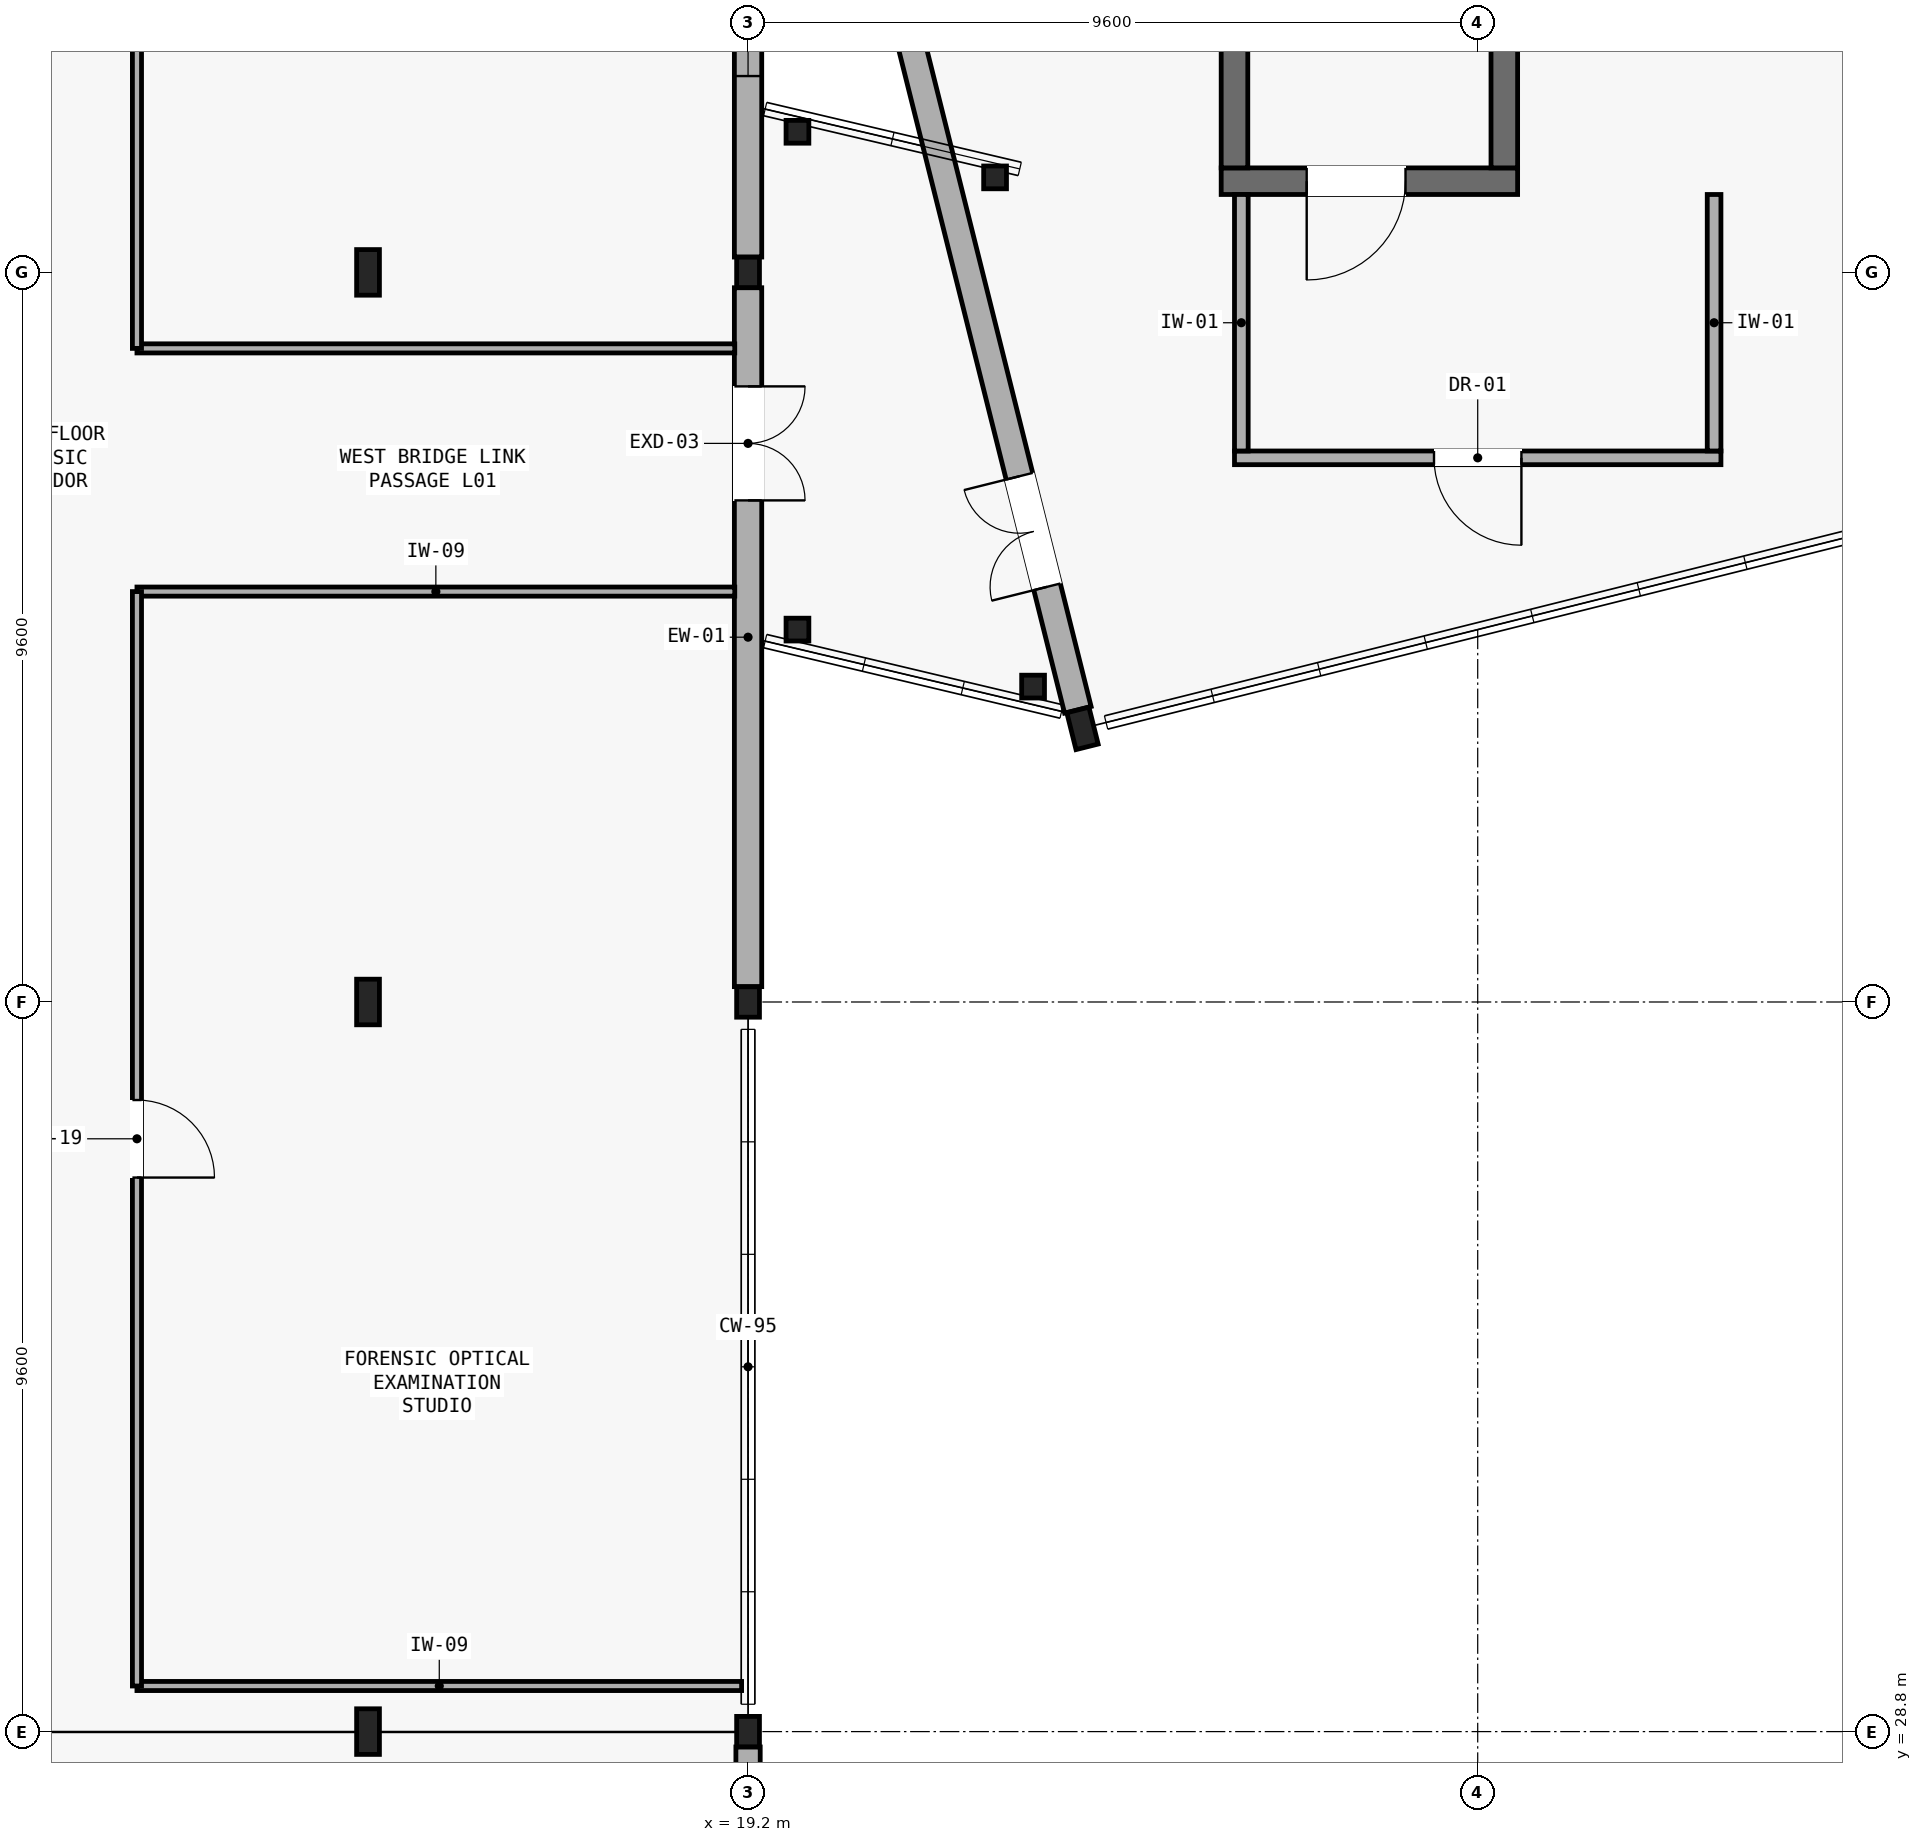
"""IFC4 building model, lengths in metres.
Left out: names, types, materials, properties, quantities, classifications, styles, units other than length and angle.
Written with IfcOpenShell. Run it as: python <this file> out.ifc"""

import sys

from ifc_helpers import new_model, si_unit, direction, frame, frame_2d, origin, origin_2d, place, context, subcontext, project, spatial, rectangle, i_section, extrude, element, fill, save


model = new_model("IFC4")
c1 = context("Model", 3, precision=1e-05, world=origin(), true_north=direction((0.0, 1.0)))
c2 = subcontext(c1, "Body", "Model", "MODEL_VIEW")
j1 = project(units=[si_unit("LENGTHUNIT", "METRE"), si_unit("PLANEANGLEUNIT", "RADIAN")], contexts=[c1])
p1 = place(None, origin())
s1 = spatial("IfcSite", under=j1, at=p1, CompositionType="ELEMENT")
p2 = place(p1, origin())
s2 = spatial("IfcBuilding", under=s1, at=p2, CompositionType="ELEMENT")
p3 = place(p2, frame((0.0, 0.0, 5.25)))
s3 = spatial("IfcBuildingStorey", under=s2, at=p3, CompositionType="ELEMENT", Elevation=5.25)
for number, where, z_axis, x_axis in (
    (1, (19.85, 49.85, 0.0), (0.0, 0.0, 1.0), (1.0, 0.0, 0.0)),
    (2, (19.85, 43.3, 0.0), (0.0, 0.0, 1.0), (1.0, 0.0, 0.0)),
    (3, (22.45, 49.25, 0.0), (0.0, 0.0, 1.0), (1.0, 0.0, 0.0)),
    (4, (22.95, 42.55, 0.0), (0.0, 0.0, 1.0), (1.0, 0.0, 0.0)),
):
    element("IfcColumn", number, at=place(p3, frame(where, z_axis=z_axis, x_axis=x_axis)), inside=s3, PredefinedType="COLUMN", context=c2, shape_type="SweptSolid", body=[
        extrude(i_section(OverallWidth=0.3, OverallDepth=0.3, WebThickness=0.011, FlangeThickness=0.019, FilletRadius=0.027, at=origin_2d()), origin(), (0.0, 0.0, 1.0), 4.2),
    ])
p4 = place(p3, frame((19.2, 28.8, 0.0), z_axis=(0.0, 0.0, 1.0), x_axis=(1.0, 0.0, 0.0)))
e5 = element("IfcColumn", 5, at=p4, inside=s3, PredefinedType="COLUMN", context=c2, shape_type="SweptSolid", body=[
    extrude(i_section(OverallWidth=0.3, OverallDepth=0.4, WebThickness=0.013, FlangeThickness=0.024, FilletRadius=0.027, at=origin_2d()), origin(), (0.0, 0.0, 1.0), 4.2),
])
p5 = place(p3, frame((14.2, 28.8, 0.0), z_axis=(0.0, 0.0, 1.0), x_axis=(1.0, 0.0, 0.0)))
e6 = element("IfcColumn", 6, at=p5, inside=s3, PredefinedType="COLUMN", context=c2, shape_type="SweptSolid", body=[
    extrude(i_section(OverallWidth=0.3, OverallDepth=0.6, WebThickness=0.015, FlangeThickness=0.03, FilletRadius=0.027, at=origin_2d()), origin(), (0.0, 0.0, 1.0), 4.2),
])
p6 = place(p3, frame((19.2, 38.4, 0.0), z_axis=(0.0, 0.0, 1.0), x_axis=(1.0, 0.0, 0.0)))
e7 = element("IfcColumn", 7, at=p6, inside=s3, PredefinedType="COLUMN", context=c2, shape_type="SweptSolid", body=[
    extrude(i_section(OverallWidth=0.3, OverallDepth=0.4, WebThickness=0.013, FlangeThickness=0.024, FilletRadius=0.027, at=origin_2d()), origin(), (0.0, 0.0, 1.0), 4.2),
])
p7 = place(p3, frame((14.2, 38.4, 0.0), z_axis=(0.0, 0.0, 1.0), x_axis=(1.0, 0.0, 0.0)))
e8 = element("IfcColumn", 8, at=p7, inside=s3, PredefinedType="COLUMN", context=c2, shape_type="SweptSolid", body=[
    extrude(i_section(OverallWidth=0.3, OverallDepth=0.6, WebThickness=0.015, FlangeThickness=0.03, FilletRadius=0.027, at=origin_2d()), origin(), (0.0, 0.0, 1.0), 4.2),
])
p8 = place(p3, frame((19.2, 48.0, 0.0), z_axis=(0.0, 0.0, 1.0), x_axis=(1.0, 0.0, 0.0)))
e9 = element("IfcColumn", 9, at=p8, inside=s3, PredefinedType="COLUMN", context=c2, shape_type="SweptSolid", body=[
    extrude(i_section(OverallWidth=0.3, OverallDepth=0.4, WebThickness=0.013, FlangeThickness=0.024, FilletRadius=0.027, at=origin_2d()), origin(), (0.0, 0.0, 1.0), 4.2),
])
p9 = place(p3, frame((14.2, 48.0, 0.0), z_axis=(0.0, 0.0, 1.0), x_axis=(1.0, 0.0, 0.0)))
e10 = element("IfcColumn", 10, at=p9, inside=s3, PredefinedType="COLUMN", context=c2, shape_type="SweptSolid", body=[
    extrude(i_section(OverallWidth=0.3, OverallDepth=0.6, WebThickness=0.015, FlangeThickness=0.03, FilletRadius=0.027, at=origin_2d()), origin(), (0.0, 0.0, 1.0), 4.2),
])
p10 = place(p3, frame((23.6, 42.0, 0.0), z_axis=(0.0, 0.0, 1.0), x_axis=(0.970142500145, 0.242535625038, 0.0)))
e11 = element("IfcColumn", 11, at=p10, inside=s3, PredefinedType="COLUMN", context=c2, shape_type="SweptSolid", body=[
    extrude(i_section(OverallWidth=0.3, OverallDepth=0.5, WebThickness=0.014, FlangeThickness=0.028, FilletRadius=0.027, at=origin_2d()), origin(), (0.0, 0.0, 1.0), 4.2),
])
p11 = place(p3, frame((19.2, 38.602, 0.0), z_axis=(0.0, 0.0, 1.0), x_axis=(0.0, 1.0, 0.0)))
e12 = element("IfcWall", 12, at=p11, inside=s3, PredefinedType="SOLIDWALL", context=c2, shape_type="SweptSolid", body=[
    extrude(rectangle(XDim=9.196, YDim=0.36, at=frame_2d((4.598, 0.0))), origin(), (0.0, 0.0, 1.0), 3.5),
])
p12 = place(p11, frame((6.398, 0.0, 0.0)))
e13 = element("IfcOpeningElement", 13, at=p12, cuts=e12, PredefinedType="OPENING", context=c2, shape_type="SweptSolid", body=[
    extrude(rectangle(XDim=1.5, YDim=2.2, at=frame_2d((0.75, 1.1))), frame((0.0, 0.19, 0.0), z_axis=(0.0, -1.0, 0.0), x_axis=(1.0, 0.0, 0.0)), (0.0, 0.0, 1.0), 0.38),
])
p13 = place(p3, frame((19.2, 48.202, 0.0), z_axis=(0.0, 0.0, 1.0), x_axis=(0.0, 1.0, 0.0)))
e14 = element("IfcWall", 14, at=p13, inside=s3, PredefinedType="SOLIDWALL", context=c2, shape_type="SweptSolid", body=[
    extrude(rectangle(XDim=9.196, YDim=0.36, at=frame_2d((4.598, 0.0))), origin(), (0.0, 0.0, 1.0), 3.5),
])
p14 = place(p13, frame((2.381, 0.0, 0.9)))
e15 = element("IfcOpeningElement", 15, at=p14, cuts=e14, PredefinedType="OPENING", context=c2, shape_type="SweptSolid", body=[
    extrude(rectangle(XDim=1.5, YDim=1.55, at=frame_2d((0.75, 0.775))), frame((0.0, 0.19, 0.0), z_axis=(0.0, -1.0, 0.0), x_axis=(1.0, 0.0, 0.0)), (0.0, 0.0, 1.0), 0.38),
])
p15 = place(p13, frame((5.315, 0.0, 0.9)))
e16 = element("IfcOpeningElement", 16, at=p15, cuts=e14, PredefinedType="OPENING", context=c2, shape_type="SweptSolid", body=[
    extrude(rectangle(XDim=1.5, YDim=1.55, at=frame_2d((0.75, 0.775))), frame((0.0, 0.19, 0.0), z_axis=(0.0, -1.0, 0.0), x_axis=(1.0, 0.0, 0.0)), (0.0, 0.0, 1.0), 0.38),
])
p16 = place(p3, frame((23.539, 42.244, 0.0), z_axis=(0.0, 0.0, 1.0), x_axis=(-0.242523223331, 0.970145600487, 0.0)))
e17 = element("IfcWall", 17, at=p16, inside=s3, PredefinedType="SOLIDWALL", context=c2, shape_type="SweptSolid", body=[
    extrude(rectangle(XDim=13.896, YDim=0.36, at=frame_2d((6.948, 0.0))), origin(), (0.0, 0.0, 1.0), 3.4),
])
p17 = place(p16, frame((1.668, 0.0, 0.0)))
e18 = element("IfcOpeningElement", 18, at=p17, cuts=e17, PredefinedType="OPENING", context=c2, shape_type="SweptSolid", body=[
    extrude(rectangle(XDim=1.5, YDim=2.2, at=frame_2d((0.75, 1.1))), frame((0.0, 0.19, 0.0), z_axis=(0.0, -1.0, 0.0), x_axis=(1.0, 0.0, 0.0)), (0.0, 0.0, 1.0), 0.38),
])
p18 = place(p3, frame((19.2, 27.372, 0.0), z_axis=(0.0, 0.0, 1.0), x_axis=(0.0, 1.0, 0.0)))
e19 = element("IfcWall", 19, at=p18, inside=s3, PredefinedType="SOLIDWALL", context=c2, shape_type="SweptSolid", body=[
    extrude(rectangle(XDim=1.226, YDim=0.32, at=frame_2d((0.613, 0.0))), origin(), (0.0, 0.0, 1.0), 3.9),
])
p19 = place(p3, frame((25.425, 49.2, 0.0), z_axis=(0.0, 0.0, 1.0), x_axis=(1.0, 0.0, 0.0)))
e20 = element("IfcWall", 20, at=p19, inside=s3, PredefinedType="SHEAR", context=c2, shape_type="SweptSolid", body=[
    extrude(rectangle(XDim=3.9, YDim=0.35, at=frame_2d((1.95, 0.0))), origin(), (0.0, 0.0, 1.0), 3.96),
])
p20 = place(p19, frame((1.125, 0.0, 0.0)))
e21 = element("IfcOpeningElement", 21, at=p20, cuts=e20, PredefinedType="OPENING", context=c2, shape_type="SweptSolid", body=[
    extrude(rectangle(XDim=1.3, YDim=2.15, at=frame_2d((0.65, 1.075))), frame((0.0, 0.185, 0.0), z_axis=(0.0, -1.0, 0.0), x_axis=(1.0, 0.0, 0.0)), (0.0, 0.0, 1.0), 0.37),
])
for number, where, z_axis, x_axis in (
    (22, (25.6, 49.375, 0.0), (0.0, 0.0, 1.0), (0.0, 1.0, 0.0)),
    (23, (29.15, 49.375, 0.0), (0.0, 0.0, 1.0), (0.0, 1.0, 0.0)),
):
    element("IfcWall", number, at=place(p3, frame(where, z_axis=z_axis, x_axis=x_axis)), inside=s3, PredefinedType="SHEAR", context=c2, shape_type="SweptSolid", body=[
        extrude(rectangle(XDim=7.6, YDim=0.35, at=frame_2d((3.8, 0.0))), origin(), (0.0, 0.0, 1.0), 3.96),
    ])
p21 = place(p3, frame((25.6, 45.56, 0.0), z_axis=(0.0, 0.0, 1.0), x_axis=(1.0, 0.0, 0.0)))
e24 = element("IfcWall", 24, at=p21, inside=s3, PredefinedType="PARTITIONING", context=c2, shape_type="SweptSolid", body=[
    extrude(rectangle(XDim=6.4, YDim=0.18, at=frame_2d((3.2, 0.0))), origin(), (0.0, 0.0, 1.0), 3.58),
])
p22 = place(p21, frame((2.625, 0.0, 0.0)))
e25 = element("IfcOpeningElement", 25, at=p22, cuts=e24, PredefinedType="OPENING", context=c2, shape_type="SweptSolid", body=[
    extrude(rectangle(XDim=1.15, YDim=2.15, at=frame_2d((0.575, 1.075))), frame((0.0, 0.1, 0.0), z_axis=(0.0, -1.0, 0.0), x_axis=(1.0, 0.0, 0.0)), (0.0, 0.0, 1.0), 0.2),
])
for number, where, z_axis, x_axis in (
    (26, (25.69, 45.65, 0.0), (0.0, 0.0, 1.0), (0.0, 1.0, 0.0)),
    (27, (31.91, 45.65, 0.0), (0.0, 0.0, 1.0), (0.0, 1.0, 0.0)),
):
    element("IfcWall", number, at=place(p3, frame(where, z_axis=z_axis, x_axis=x_axis)), inside=s3, PredefinedType="PARTITIONING", context=c2, shape_type="SweptSolid", body=[
        extrude(rectangle(XDim=3.375, YDim=0.18, at=frame_2d((1.688, 0.0))), origin(), (0.0, 0.0, 1.0), 3.96),
    ])
p23 = place(p3, frame((11.16, 29.4, 0.0), z_axis=(0.0, 0.0, 1.0), x_axis=(1.0, 0.0, 0.0)))
e28 = element("IfcWall", 28, at=p23, inside=s3, PredefinedType="PARTITIONING", context=c2, shape_type="SweptSolid", body=[
    extrude(rectangle(XDim=7.955, YDim=0.12, at=frame_2d((3.978, 0.0))), origin(), (0.0, 0.0, 1.0), 3.96),
])
p24 = place(p3, frame((19.025, 43.8, 0.0), z_axis=(0.0, 0.0, 1.0), x_axis=(-1.0, 0.0, 0.0)))
e29 = element("IfcWall", 29, at=p24, inside=s3, PredefinedType="PARTITIONING", context=c2, shape_type="SweptSolid", body=[
    extrude(rectangle(XDim=7.865, YDim=0.12, at=frame_2d((3.933, 0.0))), origin(), (0.0, 0.0, 1.0), 3.96),
])
p25 = place(p3, frame((11.16, 43.8, 0.0), z_axis=(0.0, 0.0, 1.0), x_axis=(0.0, -1.0, 0.0)))
e30 = element("IfcWall", 30, at=p25, inside=s3, PredefinedType="PARTITIONING", context=c2, shape_type="SweptSolid", body=[
    extrude(rectangle(XDim=14.4, YDim=0.12, at=frame_2d((7.2, 0.0))), origin(), (0.0, 0.0, 1.0), 3.58),
])
p26 = place(p25, frame((6.69, 0.0, 0.0)))
e31 = element("IfcOpeningElement", 31, at=p26, cuts=e30, PredefinedType="OPENING", context=c2, shape_type="SweptSolid", body=[
    extrude(rectangle(XDim=1.02, YDim=2.1, at=frame_2d((0.51, 1.05))), frame((0.0, 0.07, 0.0), z_axis=(0.0, -1.0, 0.0), x_axis=(1.0, 0.0, 0.0)), (0.0, 0.0, 1.0), 0.14),
])
p27 = place(p3, frame((11.16, 47.0, 0.0), z_axis=(0.0, 0.0, 1.0), x_axis=(1.0, 0.0, 0.0)))
e32 = element("IfcWall", 32, at=p27, inside=s3, PredefinedType="PARTITIONING", context=c2, shape_type="SweptSolid", body=[
    extrude(rectangle(XDim=7.865, YDim=0.12, at=frame_2d((3.933, 0.0))), origin(), (0.0, 0.0, 1.0), 3.96),
])
p28 = place(p3, frame((11.16, 82.6, 0.0), z_axis=(0.0, 0.0, 1.0), x_axis=(0.0, -1.0, 0.0)))
e33 = element("IfcWall", 33, at=p28, inside=s3, PredefinedType="PARTITIONING", context=c2, shape_type="SweptSolid", body=[
    extrude(rectangle(XDim=35.6, YDim=0.12, at=frame_2d((17.8, 0.0))), origin(), (0.0, 0.0, 1.0), 3.58),
])
p29 = place(p28, frame((17.31, 0.0, 0.0)))
e34 = element("IfcOpeningElement", 34, at=p29, cuts=e33, PredefinedType="OPENING", context=c2, shape_type="SweptSolid", body=[
    extrude(rectangle(XDim=0.98, YDim=2.1, at=frame_2d((0.49, 1.05))), frame((0.0, 0.07, 0.0), z_axis=(0.0, -1.0, 0.0), x_axis=(1.0, 0.0, 0.0)), (0.0, 0.0, 1.0), 0.14),
])
p30 = place(p3, frame((32.74, 59.041, 0.0), z_axis=(0.0, 0.0, 1.0), x_axis=(0.242525471141, -0.970145038563, 0.0)))
e35 = element("IfcWall", 35, at=p30, inside=s3, PredefinedType="PARTITIONING", context=c2, shape_type="SweptSolid", body=[
    extrude(rectangle(XDim=11.315, YDim=0.14, at=frame_2d((5.657, 0.0))), origin(), (0.0, 0.0, 1.0), 3.96),
])
p31 = place(p12, frame((1.5, 0.0, 0.0), z_axis=(0.0, 0.0, 1.0), x_axis=(-1.0, 0.0, 0.0)))
e36 = element("IfcDoor", 36, at=p31, inside=s3, OperationType="SINGLE_SWING_LEFT", PredefinedType="DOOR", context=c2, shape_type="SweptSolid", body=[
    extrude(rectangle(XDim=1.5, YDim=2.2, at=frame_2d((0.75, 1.1))), frame((0.0, 0.025, 0.0), z_axis=(0.0, -1.0, 0.0), x_axis=(1.0, 0.0, 0.0)), (0.0, 0.0, 1.0), 0.05),
])
fill(e13, e36)
p32 = place(p14, origin())
e37 = element("IfcWindow", 37, at=p32, inside=s3, PartitioningType="SINGLE_PANEL", PredefinedType="WINDOW", context=c2, shape_type="SweptSolid", body=[
    extrude(rectangle(XDim=1.5, YDim=1.55, at=frame_2d((0.75, 0.775))), frame((0.0, 0.03, 0.0), z_axis=(0.0, -1.0, 0.0), x_axis=(1.0, 0.0, 0.0)), (0.0, 0.0, 1.0), 0.06),
])
fill(e15, e37)
p33 = place(p17, origin())
e38 = element("IfcDoor", 38, at=p33, inside=s3, OperationType="SINGLE_SWING_LEFT", PredefinedType="DOOR", context=c2, shape_type="SweptSolid", body=[
    extrude(rectangle(XDim=1.5, YDim=2.2, at=frame_2d((0.75, 1.1))), frame((0.0, 0.025, 0.0), z_axis=(0.0, -1.0, 0.0), x_axis=(1.0, 0.0, 0.0)), (0.0, 0.0, 1.0), 0.05),
])
fill(e18, e38)
p34 = place(p20, frame((1.3, 0.0, 0.0), z_axis=(0.0, 0.0, 1.0), x_axis=(-1.0, 0.0, 0.0)))
e39 = element("IfcDoor", 39, at=p34, inside=s3, OperationType="SINGLE_SWING_LEFT", PredefinedType="DOOR", context=c2, shape_type="SweptSolid", body=[
    extrude(rectangle(XDim=1.3, YDim=2.15, at=frame_2d((0.65, 1.075))), frame((0.0, 0.025, 0.0), z_axis=(0.0, -1.0, 0.0), x_axis=(1.0, 0.0, 0.0)), (0.0, 0.0, 1.0), 0.05),
])
fill(e21, e39)
p35 = place(p22, frame((1.15, 0.0, 0.0), z_axis=(0.0, 0.0, 1.0), x_axis=(-1.0, 0.0, 0.0)))
e40 = element("IfcDoor", 40, at=p35, inside=s3, OperationType="SINGLE_SWING_RIGHT", PredefinedType="DOOR", context=c2, shape_type="SweptSolid", body=[
    extrude(rectangle(XDim=1.15, YDim=2.15, at=frame_2d((0.575, 1.075))), frame((0.0, 0.025, 0.0), z_axis=(0.0, -1.0, 0.0), x_axis=(1.0, 0.0, 0.0)), (0.0, 0.0, 1.0), 0.05),
])
fill(e25, e40)
p36 = place(p26, origin())
e41 = element("IfcDoor", 41, at=p36, inside=s3, OperationType="SINGLE_SWING_RIGHT", PredefinedType="DOOR", context=c2, shape_type="SweptSolid", body=[
    extrude(rectangle(XDim=1.02, YDim=2.1, at=frame_2d((0.51, 1.05))), frame((0.0, 0.025, 0.0), z_axis=(0.0, -1.0, 0.0), x_axis=(1.0, 0.0, 0.0)), (0.0, 0.0, 1.0), 0.05),
])
fill(e31, e41)
save(model, sys.argv[1])
